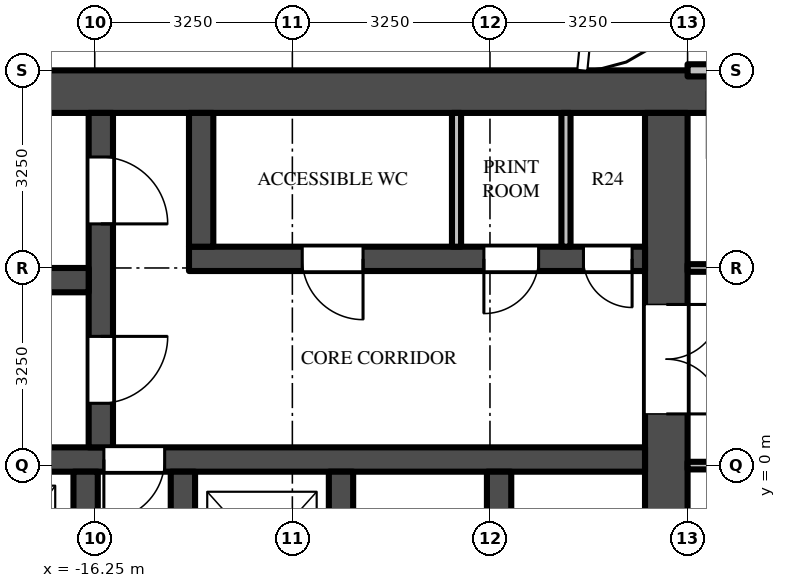
"""IFC4 building model, lengths in metres.
Left out: names, types, materials, properties, quantities, classifications, styles, units other than length and angle.
Written with IfcOpenShell. Run it as: python <this file> out.ifc"""

import sys

from ifc_helpers import new_model, si_unit, direction, frame, frame_2d, origin, place, context, subcontext, project, spatial, rectangle, extrude, source, transform, mapped, element, fill, save


model = new_model("IFC4")
c1 = context("Model", 3, precision=1e-05, world=origin(), true_north=direction((0.0, 1.0)))
c2 = subcontext(c1, "Body", "Model", "MODEL_VIEW")
j1 = project(units=[si_unit("LENGTHUNIT", "METRE"), si_unit("PLANEANGLEUNIT", "RADIAN")], contexts=[c1])
p1 = place(None, origin())
s1 = spatial("IfcSite", under=j1, at=p1, CompositionType="ELEMENT")
p2 = place(p1, origin())
s2 = spatial("IfcBuilding", under=s1, at=p2, CompositionType="ELEMENT")
p3 = place(p2, frame((0.0, 0.0, 244.1)))
s3 = spatial("IfcBuildingStorey", under=s2, at=p3, CompositionType="ELEMENT", Elevation=244.1)
m1 = source(origin(), c2, "Body", "SweptSolid", [
    extrude(rectangle(XDim=16.6, YDim=0.7, at=frame_2d((8.3, 0.0))), origin(), (0.0, 0.0, 1.0), 3.7),
])
p4 = place(p3, frame((-6.15, 6.15, 0.0), z_axis=(0.0, 0.0, 1.0), x_axis=(-1.0, 0.0, 0.0)))
e1 = element("IfcWall", 1, at=p4, inside=s3, PredefinedType="SHEAR", context=c2, shape_type="MappedRepresentation", body=[
    mapped(m1, transform((0.0, 0.0, 0.0))),
])
m2 = source(origin(), c2, "Body", "SweptSolid", [
    extrude(rectangle(XDim=9.05, YDim=0.7, at=frame_2d((4.525, 0.0))), origin(), (0.0, 0.0, 1.0), 3.7),
])
p5 = place(p3, frame((-6.85, 5.8, 0.0), z_axis=(0.0, 0.0, 1.0), x_axis=(0.0, -1.0, 0.0)))
e2 = element("IfcWall", 2, at=p5, inside=s3, PredefinedType="SHEAR", context=c2, shape_type="MappedRepresentation", body=[
    mapped(m2, transform((0.0, 0.0, 0.0))),
])
m3 = source(origin(), c2, "Body", "SweptSolid", [
    extrude(rectangle(XDim=1.8, YDim=2.1, at=frame_2d((0.9, 1.05))), frame((0.0, 0.36, 0.0), z_axis=(0.0, -1.0, 0.0), x_axis=(1.0, 0.0, 0.0)), (0.0, 0.0, 1.0), 0.72),
])
p6 = place(p5, frame((3.15, 0.0, 0.0)))
e3 = element("IfcOpeningElement", 3, at=p6, cuts=e2, PredefinedType="OPENING", context=c2, shape_type="MappedRepresentation", body=[
    mapped(m3, transform((0.0, 0.0, 0.0))),
])
m4 = source(origin(), c2, "Body", "SweptSolid", [
    extrude(rectangle(XDim=7.5, YDim=0.4, at=frame_2d((3.75, 0.0))), origin(), (0.0, 0.0, 1.0), 3.7),
])
p7 = place(p3, frame((-7.2, 3.4, 0.0), z_axis=(0.0, 0.0, 1.0), x_axis=(-1.0, 0.0, 0.0)))
e4 = element("IfcWall", 4, at=p7, inside=s3, PredefinedType="SHEAR", context=c2, shape_type="MappedRepresentation", body=[
    mapped(m4, transform((0.0, 0.0, 0.0))),
])
m5 = source(origin(), c2, "Body", "SweptSolid", [
    extrude(rectangle(XDim=0.8, YDim=2.1, at=frame_2d((0.4, 1.05))), frame((0.0, 0.21, 0.0), z_axis=(0.0, -1.0, 0.0), x_axis=(1.0, 0.0, 0.0)), (0.0, 0.0, 1.0), 0.42),
])
p8 = place(p7, frame((0.212, 0.0, 0.0)))
e5 = element("IfcOpeningElement", 5, at=p8, cuts=e4, PredefinedType="OPENING", context=c2, shape_type="MappedRepresentation", body=[
    mapped(m5, transform((0.0, 0.0, 0.0))),
])
m6 = source(origin(), c2, "Body", "SweptSolid", [
    extrude(rectangle(XDim=0.9, YDim=2.1, at=frame_2d((0.45, 1.05))), frame((0.0, 0.21, 0.0), z_axis=(0.0, -1.0, 0.0), x_axis=(1.0, 0.0, 0.0)), (0.0, 0.0, 1.0), 0.42),
])
p9 = place(p7, frame((1.75, 0.0, 0.0)))
e6 = element("IfcOpeningElement", 6, at=p9, cuts=e4, PredefinedType="OPENING", context=c2, shape_type="MappedRepresentation", body=[
    mapped(m6, transform((0.0, 0.0, 0.0))),
])
m7 = source(origin(), c2, "Body", "SweptSolid", [
    extrude(rectangle(XDim=1.0, YDim=2.1, at=frame_2d((0.5, 1.05))), frame((0.0, 0.21, 0.0), z_axis=(0.0, -1.0, 0.0), x_axis=(1.0, 0.0, 0.0)), (0.0, 0.0, 1.0), 0.42),
])
p10 = place(p7, frame((4.637, 0.0, 0.0)))
e7 = element("IfcOpeningElement", 7, at=p10, cuts=e4, PredefinedType="OPENING", context=c2, shape_type="MappedRepresentation", body=[
    mapped(m7, transform((0.0, 0.0, 0.0))),
])
m8 = source(origin(), c2, "Body", "SweptSolid", [
    extrude(rectangle(XDim=14.85, YDim=0.4, at=frame_2d((7.425, 0.0))), origin(), (0.0, 0.0, 1.0), 3.7),
])
p11 = place(p3, frame((-7.2, 0.1, 0.0), z_axis=(0.0, 0.0, 1.0), x_axis=(-1.0, 0.0, 0.0)))
e8 = element("IfcWall", 8, at=p11, inside=s3, PredefinedType="SHEAR", context=c2, shape_type="MappedRepresentation", body=[
    mapped(m8, transform((0.0, 0.0, 0.0))),
])
p12 = place(p11, frame((7.9, 0.0, 0.0)))
e9 = element("IfcOpeningElement", 9, at=p12, cuts=e8, PredefinedType="OPENING", context=c2, shape_type="MappedRepresentation", body=[
    mapped(m7, transform((0.0, 0.0, 0.0))),
])
m9 = source(origin(), c2, "Body", "SweptSolid", [
    extrude(rectangle(XDim=5.5, YDim=0.4, at=frame_2d((2.75, 0.0))), origin(), (0.0, 0.0, 1.0), 3.7),
])
p13 = place(p3, frame((-16.15, 5.8, 0.0), z_axis=(0.0, 0.0, 1.0), x_axis=(0.0, -1.0, 0.0)))
e10 = element("IfcWall", 10, at=p13, inside=s3, PredefinedType="SHEAR", context=c2, shape_type="MappedRepresentation", body=[
    mapped(m9, transform((0.0, 0.0, 0.0))),
])
m10 = source(origin(), c2, "Body", "SweptSolid", [
    extrude(rectangle(XDim=1.1, YDim=2.1, at=frame_2d((0.55, 1.05))), frame((0.0, 0.21, 0.0), z_axis=(0.0, -1.0, 0.0), x_axis=(1.0, 0.0, 0.0)), (0.0, 0.0, 1.0), 0.42),
])
p14 = place(p13, frame((0.725, 0.0, 0.0)))
e11 = element("IfcOpeningElement", 11, at=p14, cuts=e10, PredefinedType="OPENING", context=c2, shape_type="MappedRepresentation", body=[
    mapped(m10, transform((0.0, 0.0, 0.0))),
])
p15 = place(p13, frame((3.675, 0.0, 0.0)))
e12 = element("IfcOpeningElement", 12, at=p15, cuts=e10, PredefinedType="OPENING", context=c2, shape_type="MappedRepresentation", body=[
    mapped(m10, transform((0.0, 0.0, 0.0))),
])
m11 = source(origin(), c2, "Body", "SweptSolid", [
    extrude(rectangle(XDim=5.7, YDim=0.4, at=frame_2d((2.85, 0.0))), origin(), (0.0, 0.0, 1.0), 3.7),
])
p16 = place(p3, frame((-16.35, 3.05, 0.0), z_axis=(0.0, 0.0, 1.0), x_axis=(-1.0, 0.0, 0.0)))
e13 = element("IfcWall", 13, at=p16, inside=s3, PredefinedType="SHEAR", context=c2, shape_type="MappedRepresentation", body=[
    mapped(m11, transform((0.0, 0.0, 0.0))),
])
m12 = source(origin(), c2, "Body", "SweptSolid", [
    extrude(rectangle(XDim=2.2, YDim=0.4, at=frame_2d((1.1, 0.0))), origin(), (0.0, 0.0, 1.0), 3.7),
])
p17 = place(p3, frame((-14.5, 5.8, 0.0), z_axis=(0.0, 0.0, 1.0), x_axis=(0.0, -1.0, 0.0)))
e14 = element("IfcWall", 14, at=p17, inside=s3, PredefinedType="SHEAR", context=c2, shape_type="MappedRepresentation", body=[
    mapped(m12, transform((0.0, 0.0, 0.0))),
])
m13 = source(origin(), c2, "Body", "SweptSolid", [
    extrude(rectangle(XDim=2.45, YDim=0.4, at=frame_2d((1.225, 0.0))), origin(), (0.0, 0.0, 1.0), 3.7),
])
for number, where, z_axis, x_axis in (
    (15, (-9.6, -0.1, 0.0), (0.0, 0.0, 1.0), (0.0, -1.0, 0.0)),
    (16, (-12.2, -0.1, 0.0), (0.0, 0.0, 1.0), (0.0, -1.0, 0.0)),
    (17, (-14.8, -0.1, 0.0), (0.0, 0.0, 1.0), (0.0, -1.0, 0.0)),
    (18, (-16.4, -0.1, 0.0), (0.0, 0.0, 1.0), (0.0, -1.0, 0.0)),
):
    element("IfcWall", number, at=place(p3, frame(where, z_axis=z_axis, x_axis=x_axis)), inside=s3, PredefinedType="SHEAR", context=c2, shape_type="MappedRepresentation", body=[
        mapped(m13, transform((0.0, 0.0, 0.0))),
    ])
m14 = source(origin(), c2, "Body", "SweptSolid", [
    extrude(rectangle(XDim=2.2, YDim=0.15, at=frame_2d((1.1, 0.0))), origin(), (0.0, 0.0, 1.0), 3.7),
])
for number, where, z_axis, x_axis in (
    (19, (-8.5, 5.8, 0.0), (0.0, 0.0, 1.0), (0.0, -1.0, 0.0)),
    (20, (-10.3, 5.8, 0.0), (0.0, 0.0, 1.0), (0.0, -1.0, 0.0)),
):
    element("IfcWall", number, at=place(p3, frame(where, z_axis=z_axis, x_axis=x_axis)), inside=s3, PredefinedType="PARTITIONING", context=c2, shape_type="MappedRepresentation", body=[
        mapped(m14, transform((0.0, 0.0, 0.0))),
    ])
m15 = source(origin(), c2, "Body", "SweptSolid", [
    extrude(rectangle(XDim=5.363, YDim=0.125, at=frame_2d((2.681, 0.0))), origin(), (0.0, 0.0, 1.0), 2.997),
])
p18 = place(p3, frame((-1.137, 0.0, 0.0), z_axis=(0.0, 0.0, 1.0), x_axis=(-1.0, 0.0, 0.0)))
e21 = element("IfcWall", 21, at=p18, inside=s3, PredefinedType="PARTITIONING", context=c2, shape_type="MappedRepresentation", body=[
    mapped(m15, transform((0.0, 0.0, 0.0))),
])
m16 = source(origin(), c2, "Body", "SweptSolid", [
    extrude(rectangle(XDim=1.0, YDim=2.1, at=frame_2d((0.5, 1.05))), frame((0.0, 0.073, 0.0), z_axis=(0.0, -1.0, 0.0), x_axis=(1.0, 0.0, 0.0)), (0.0, 0.0, 1.0), 0.145),
])
p19 = place(p18, frame((4.012, 0.0, 0.0)))
e22 = element("IfcOpeningElement", 22, at=p19, cuts=e21, PredefinedType="OPENING", context=c2, shape_type="MappedRepresentation", body=[
    mapped(m16, transform((0.0, 0.0, 0.0))),
])
p20 = place(p3, frame((-6.5, 3.25, 0.0), z_axis=(0.0, 0.0, 1.0), x_axis=(1.0, 0.0, 0.0)))
e23 = element("IfcWall", 23, at=p20, inside=s3, PredefinedType="PARTITIONING", context=c2, shape_type="MappedRepresentation", body=[
    mapped(m15, transform((0.0, 0.0, 0.0))),
])
p21 = place(p20, frame((3.95, 0.0, 0.0)))
e24 = element("IfcOpeningElement", 24, at=p21, cuts=e23, PredefinedType="OPENING", context=c2, shape_type="MappedRepresentation", body=[
    mapped(m16, transform((0.0, 0.0, 0.0))),
])
m17 = source(origin(), c2, "Body", "SweptSolid", [
    extrude(rectangle(XDim=5.238, YDim=0.2, at=frame_2d((2.619, 0.0))), origin(), (0.0, 0.0, 1.0), 2.78),
])
p22 = place(p3, frame((-6.5, 6.5, 0.0), z_axis=(0.0, 0.0, 1.0), x_axis=(1.0, 0.0, 0.0)))
e25 = element("IfcWall", 25, at=p22, inside=s3, PredefinedType="PARTITIONING", context=c2, shape_type="MappedRepresentation", body=[
    mapped(m17, transform((0.0, 0.0, 0.0))),
])
m18 = source(origin(), c2, "Body", "SweptSolid", [
    extrude(rectangle(XDim=1.8, YDim=2.1, at=frame_2d((0.9, 1.05))), frame((0.0, -0.275, 0.0), z_axis=(0.0, -1.0, 0.0), x_axis=(1.0, 0.0, 0.0)), (0.0, 0.0, 1.0), 0.05),
])
p23 = place(p6, origin())
e26 = element("IfcDoor", 26, at=p23, inside=s3, OperationType="DOUBLE_DOOR_SINGLE_SWING", PredefinedType="DOOR", context=c2, shape_type="MappedRepresentation", body=[
    mapped(m18, transform((0.0, 0.0, 0.0))),
])
fill(e3, e26)
m19 = source(origin(), c2, "Body", "SweptSolid", [
    extrude(rectangle(XDim=1.1, YDim=2.1, at=frame_2d((0.55, 1.05))), frame((0.0, 0.025, 0.0), z_axis=(0.0, -1.0, 0.0), x_axis=(1.0, 0.0, 0.0)), (0.0, 0.0, 1.0), 0.05),
])
p24 = place(p14, origin())
e27 = element("IfcDoor", 27, at=p24, inside=s3, OperationType="SINGLE_SWING_RIGHT", PredefinedType="DOOR", context=c2, shape_type="MappedRepresentation", body=[
    mapped(m19, transform((0.0, 0.0, 0.0))),
])
fill(e11, e27)
p25 = place(p15, origin())
e28 = element("IfcDoor", 28, at=p25, inside=s3, OperationType="SINGLE_SWING_LEFT", PredefinedType="DOOR", context=c2, shape_type="MappedRepresentation", body=[
    mapped(m19, transform((0.0, 0.0, 0.0))),
])
fill(e12, e28)
m20 = source(origin(), c2, "Body", "SweptSolid", [
    extrude(rectangle(XDim=1.0, YDim=2.1, at=frame_2d((0.5, 1.05))), frame((0.0, 0.025, 0.0), z_axis=(0.0, -1.0, 0.0), x_axis=(1.0, 0.0, 0.0)), (0.0, 0.0, 1.0), 0.05),
])
p26 = place(p12, origin())
e29 = element("IfcDoor", 29, at=p26, inside=s3, OperationType="SINGLE_SWING_RIGHT", PredefinedType="DOOR", context=c2, shape_type="MappedRepresentation", body=[
    mapped(m20, transform((0.0, 0.0, 0.0))),
])
fill(e9, e29)
m21 = source(origin(), c2, "Body", "SweptSolid", [
    extrude(rectangle(XDim=0.8, YDim=2.1, at=frame_2d((0.4, 1.05))), frame((0.0, 0.025, 0.0), z_axis=(0.0, -1.0, 0.0), x_axis=(1.0, 0.0, 0.0)), (0.0, 0.0, 1.0), 0.05),
])
p27 = place(p8, origin())
e30 = element("IfcDoor", 30, at=p27, inside=s3, OperationType="SINGLE_SWING_LEFT", PredefinedType="DOOR", context=c2, shape_type="MappedRepresentation", body=[
    mapped(m21, transform((0.0, 0.0, 0.0))),
])
fill(e5, e30)
m22 = source(origin(), c2, "Body", "SweptSolid", [
    extrude(rectangle(XDim=0.9, YDim=2.1, at=frame_2d((0.45, 1.05))), frame((0.0, 0.025, 0.0), z_axis=(0.0, -1.0, 0.0), x_axis=(1.0, 0.0, 0.0)), (0.0, 0.0, 1.0), 0.05),
])
p28 = place(p9, origin())
e31 = element("IfcDoor", 31, at=p28, inside=s3, OperationType="SINGLE_SWING_RIGHT", PredefinedType="DOOR", context=c2, shape_type="MappedRepresentation", body=[
    mapped(m22, transform((0.0, 0.0, 0.0))),
])
fill(e6, e31)
p29 = place(p10, origin())
e32 = element("IfcDoor", 32, at=p29, inside=s3, OperationType="SINGLE_SWING_LEFT", PredefinedType="DOOR", context=c2, shape_type="MappedRepresentation", body=[
    mapped(m20, transform((0.0, 0.0, 0.0))),
])
fill(e7, e32)
save(model, sys.argv[1])
